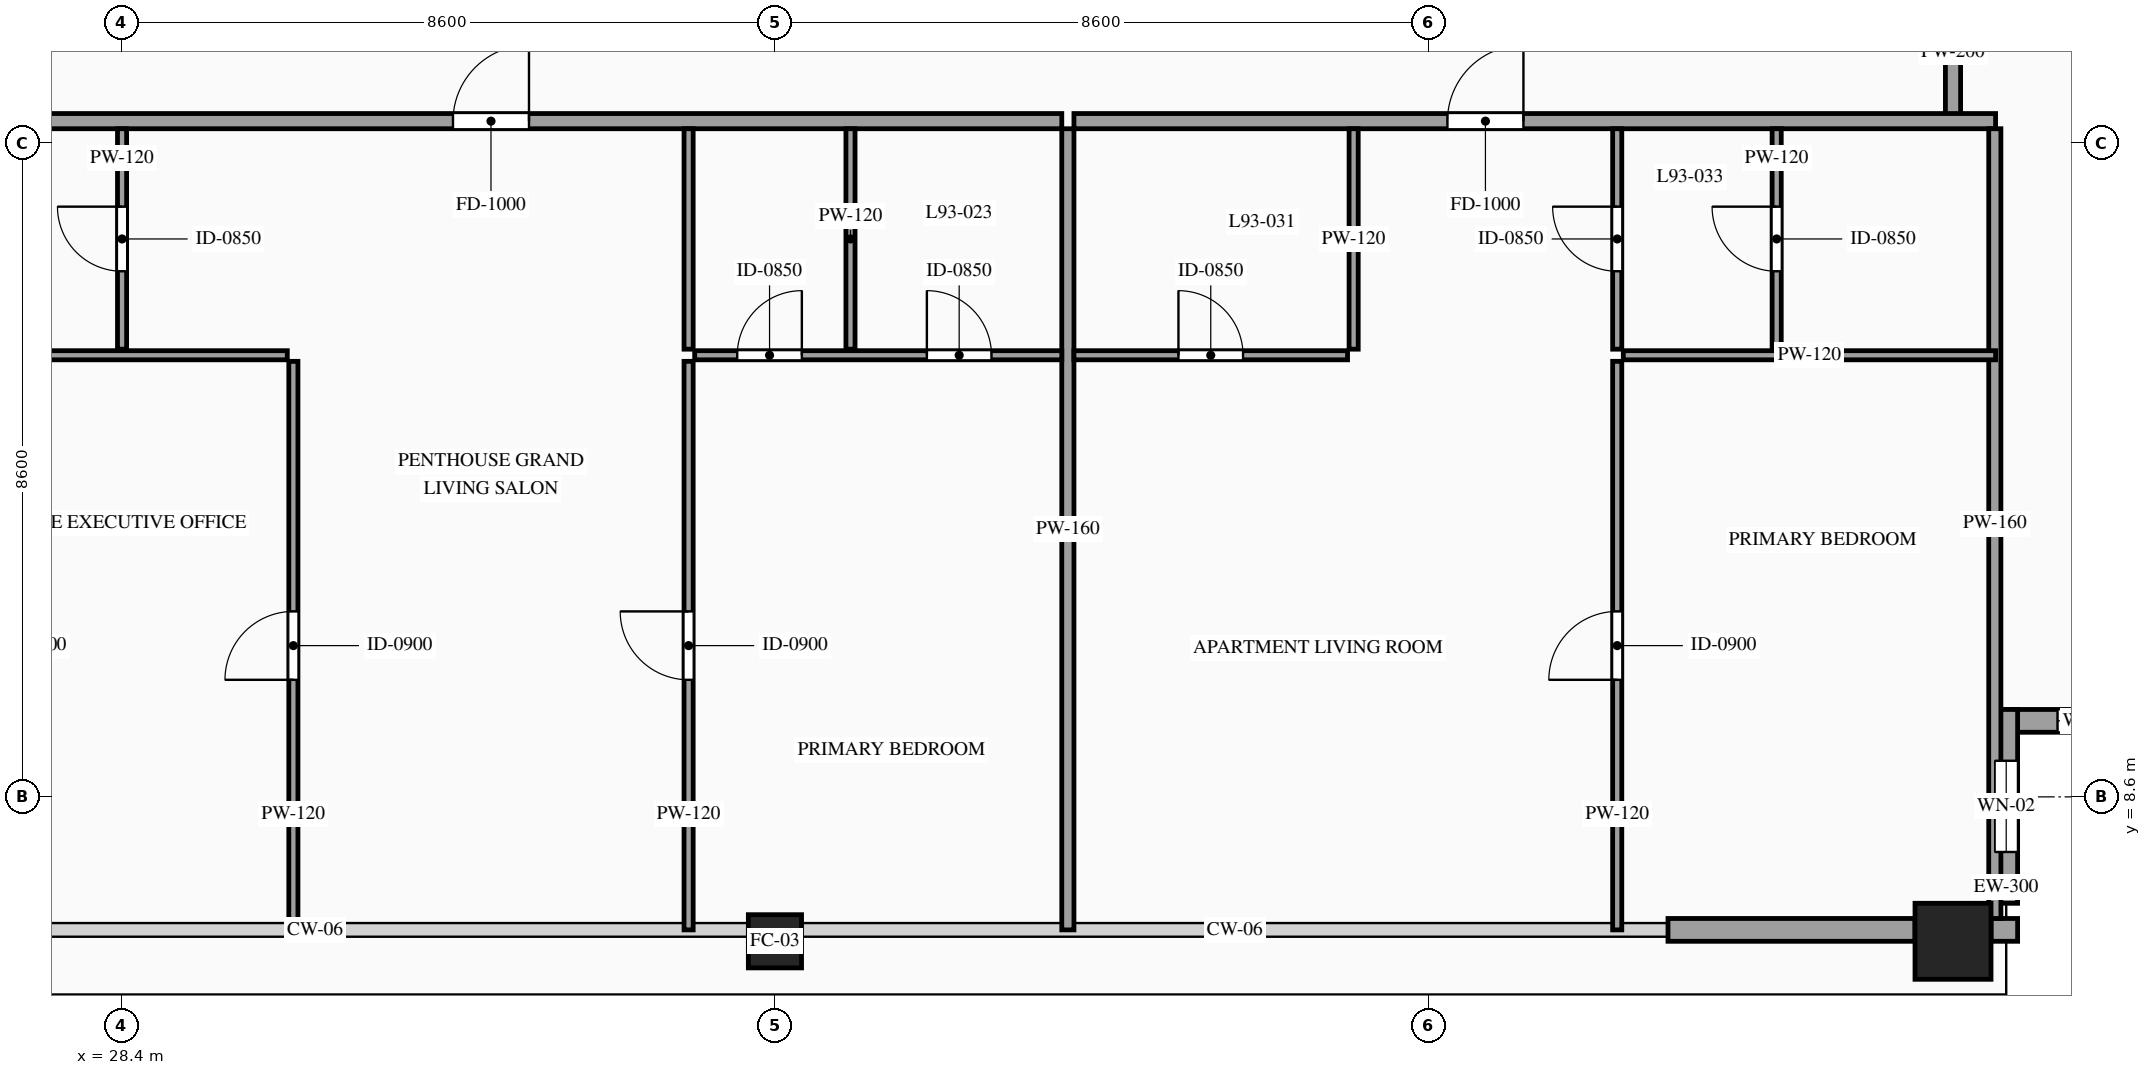
"""IFC4 building model, lengths in metres.
Left out: names, types, materials, properties, quantities, classifications, styles, units other than length and angle.
Written with IfcOpenShell. Run it as: python <this file> out.ifc"""

import sys

from ifc_helpers import new_model, si_unit, direction, frame, frame_2d, origin, origin_2d, place, context, subcontext, project, spatial, rectangle, hollow_rectangle, extrude, source, transform, mapped, element, fill, save


model = new_model("IFC4")
c1 = context("Model", 3, precision=1e-05, world=origin(), true_north=direction((0.0, 1.0)))
c2 = subcontext(c1, "Body", "Model", "MODEL_VIEW")
j1 = project(units=[si_unit("LENGTHUNIT", "METRE"), si_unit("PLANEANGLEUNIT", "RADIAN")], contexts=[c1])
p1 = place(None, origin())
s1 = spatial("IfcSite", under=j1, at=p1, CompositionType="ELEMENT")
p2 = place(p1, origin())
s2 = spatial("IfcBuilding", under=s1, at=p2, CompositionType="ELEMENT")
p3 = place(p2, frame((0.0, 0.0, 347.2)))
s3 = spatial("IfcBuildingStorey", under=s2, at=p3, CompositionType="ELEMENT", Elevation=347.2)
m1 = source(origin(), c2, "Body", "SweptSolid", [
    extrude(hollow_rectangle(XDim=0.7, YDim=0.7, WallThickness=0.032, at=origin_2d()), origin(), (0.0, 0.0, 1.0), 4.0),
])
p4 = place(p3, frame((37.0, 6.7, 0.0), z_axis=(0.0, 0.0, 1.0), x_axis=(1.0, 0.0, 0.0)))
e1 = element("IfcColumn", 1, at=p4, inside=s3, PredefinedType="COLUMN", context=c2, shape_type="MappedRepresentation", body=[
    mapped(m1, transform((0.0, 0.0, 0.0), scale=1.0)),
])
m2 = source(origin(), c2, "Body", "SweptSolid", [
    extrude(hollow_rectangle(XDim=1.0, YDim=1.0, WallThickness=0.048, at=origin_2d()), origin(), (0.0, 0.0, 1.0), 4.0),
])
p5 = place(p3, frame((52.5, 6.7, 0.0), z_axis=(0.0, 0.0, 1.0), x_axis=(1.0, 0.0, 0.0)))
e2 = element("IfcColumn", 2, at=p5, inside=s3, PredefinedType="COLUMN", context=c2, shape_type="MappedRepresentation", body=[
    mapped(m2, transform((0.0, 0.0, 0.0), scale=1.0)),
])
p6 = place(p3, frame((53.05, 9.6, 0.0), z_axis=(0.0, 0.0, 1.0), x_axis=(1.0, 0.0, 0.0)))
e3 = element("IfcWall", 3, at=p6, inside=s3, PredefinedType="SOLIDWALL", context=c2, shape_type="SweptSolid", body=[
    extrude(rectangle(XDim=2.55, YDim=0.3, at=frame_2d((1.275, 0.0))), origin(), (0.0, 0.0, 1.0), 3.7),
])
p7 = place(p6, frame((0.825, 0.0, 0.85)))
e4 = element("IfcOpeningElement", 4, at=p7, cuts=e3, PredefinedType="OPENING", context=c2, shape_type="SweptSolid", body=[
    extrude(rectangle(XDim=0.9, YDim=1.5, at=frame_2d((0.45, 0.75))), frame((0.0, 0.165, 0.0), z_axis=(0.0, -1.0, 0.0), x_axis=(1.0, 0.0, 0.0)), (0.0, 0.0, 1.0), 0.33),
])
p8 = place(p3, frame((53.2, 7.2, 0.0), z_axis=(0.0, 0.0, 1.0), x_axis=(0.0, 1.0, 0.0)))
e5 = element("IfcWall", 5, at=p8, inside=s3, PredefinedType="SOLIDWALL", context=c2, shape_type="SweptSolid", body=[
    extrude(rectangle(XDim=2.55, YDim=0.3, at=frame_2d((1.275, 0.0))), origin(), (0.0, 0.0, 1.0), 3.7),
])
p9 = place(p8, frame((0.675, 0.0, 0.85)))
e6 = element("IfcOpeningElement", 6, at=p9, cuts=e5, PredefinedType="OPENING", context=c2, shape_type="SweptSolid", body=[
    extrude(rectangle(XDim=1.2, YDim=2.1, at=frame_2d((0.6, 1.05))), frame((0.0, 0.165, 0.0), z_axis=(0.0, -1.0, 0.0), x_axis=(1.0, 0.0, 0.0)), (0.0, 0.0, 1.0), 0.33),
])
m3 = source(origin(), c2, "Body", "SweptSolid", [
    extrude(rectangle(XDim=0.35, YDim=0.3, at=frame_2d((0.175, 0.0))), origin(), (0.0, 0.0, 1.0), 3.7),
])
p10 = place(p3, frame((53.0, 6.85, 0.0), z_axis=(0.0, 0.0, 1.0), x_axis=(1.0, 0.0, 0.0)))
e7 = element("IfcWall", 7, at=p10, inside=s3, PredefinedType="SOLIDWALL", context=c2, shape_type="MappedRepresentation", body=[
    mapped(m3, transform((0.0, 0.0, 0.0), scale=1.0)),
])
m4 = source(origin(), c2, "Body", "SweptSolid", [
    extrude(rectangle(XDim=3.25, YDim=0.3, at=frame_2d((1.625, 0.0))), origin(), (0.0, 0.0, 1.0), 3.305),
])
p11 = place(p3, frame((48.75, 6.85, 0.0), z_axis=(0.0, 0.0, 1.0), x_axis=(1.0, 0.0, 0.0)))
e8 = element("IfcWall", 8, at=p11, inside=s3, PredefinedType="SOLIDWALL", context=c2, shape_type="MappedRepresentation", body=[
    mapped(m4, transform((0.0, 0.0, 0.0), scale=1.0)),
])
m5 = source(origin(), c2, "Body", "SweptSolid", [
    extrude(rectangle(XDim=1.7, YDim=0.2, at=frame_2d((0.85, 0.0))), origin(), (0.0, 0.0, 1.0), 3.7),
])
p12 = place(p3, frame((52.5, 17.55, 0.0), z_axis=(0.0, 0.0, 1.0), x_axis=(0.0, 1.0, 0.0)))
e9 = element("IfcWall", 9, at=p12, inside=s3, PredefinedType="PARTITIONING", context=c2, shape_type="MappedRepresentation", body=[
    mapped(m5, transform((0.0, 0.0, 0.0), scale=1.0)),
])
p13 = place(p3, frame((20.94, 17.49, 0.0), z_axis=(0.0, 0.0, 1.0), x_axis=(1.0, 0.0, 0.0)))
e10 = element("IfcWall", 10, at=p13, inside=s3, PredefinedType="PARTITIONING", context=c2, shape_type="SweptSolid", body=[
    extrude(rectangle(XDim=19.834, YDim=0.2, at=frame_2d((9.917, 0.0))), origin(), (0.0, 0.0, 1.0), 3.7),
])
p14 = place(p13, frame((11.824, 0.0, 0.0)))
e11 = element("IfcOpeningElement", 11, at=p14, cuts=e10, PredefinedType="OPENING", context=c2, shape_type="SweptSolid", body=[
    extrude(rectangle(XDim=1.0, YDim=2.2, at=frame_2d((0.5, 1.1))), frame((0.0, 0.115, 0.0), z_axis=(0.0, -1.0, 0.0), x_axis=(1.0, 0.0, 0.0)), (0.0, 0.0, 1.0), 0.23),
])
m6 = source(origin(), c2, "Body", "SweptSolid", [
    extrude(rectangle(XDim=10.54, YDim=0.16, at=frame_2d((5.27, 0.0))), origin(), (0.0, 0.0, 1.0), 3.7),
])
p15 = place(p3, frame((40.854, 6.85, 0.0), z_axis=(0.0, 0.0, 1.0), x_axis=(0.0, 1.0, 0.0)))
e12 = element("IfcWall", 12, at=p15, inside=s3, PredefinedType="PARTITIONING", context=c2, shape_type="MappedRepresentation", body=[
    mapped(m6, transform((0.0, 0.0, 0.0), scale=1.0)),
])
p16 = place(p3, frame((28.41, 14.49, 0.0), z_axis=(0.0, 0.0, 1.0), x_axis=(0.0, 1.0, 0.0)))
e13 = element("IfcWall", 13, at=p16, inside=s3, PredefinedType="PARTITIONING", context=c2, shape_type="SweptSolid", body=[
    extrude(rectangle(XDim=2.9, YDim=0.12, at=frame_2d((1.45, 0.0))), origin(), (0.0, 0.0, 1.0), 3.7),
])
p17 = place(p16, frame((1.025, 0.0, 0.0)))
e14 = element("IfcOpeningElement", 14, at=p17, cuts=e13, PredefinedType="OPENING", context=c2, shape_type="SweptSolid", body=[
    extrude(rectangle(XDim=0.85, YDim=2.1, at=frame_2d((0.425, 1.05))), frame((0.0, 0.075, 0.0), z_axis=(0.0, -1.0, 0.0), x_axis=(1.0, 0.0, 0.0)), (0.0, 0.0, 1.0), 0.15),
])
m7 = source(origin(), c2, "Body", "SweptSolid", [
    extrude(rectangle(XDim=2.9, YDim=0.12, at=frame_2d((1.45, 0.0))), origin(), (0.0, 0.0, 1.0), 3.7),
])
for number, where, z_axis, x_axis in (
    (15, (37.994, 14.49, 0.0), (0.0, 0.0, 1.0), (0.0, 1.0, 0.0)),
    (16, (35.864, 14.49, 0.0), (0.0, 0.0, 1.0), (0.0, 1.0, 0.0)),
):
    element("IfcWall", number, at=place(p3, frame(where, z_axis=z_axis, x_axis=x_axis)), inside=s3, PredefinedType="PARTITIONING", context=c2, shape_type="MappedRepresentation", body=[
        mapped(m7, transform((0.0, 0.0, 0.0), scale=1.0)),
    ])
p18 = place(p3, frame((35.944, 14.41, 0.0), z_axis=(0.0, 0.0, 1.0), x_axis=(1.0, 0.0, 0.0)))
e17 = element("IfcWall", 17, at=p18, inside=s3, PredefinedType="PARTITIONING", context=c2, shape_type="SweptSolid", body=[
    extrude(rectangle(XDim=4.83, YDim=0.12, at=frame_2d((2.415, 0.0))), origin(), (0.0, 0.0, 1.0), 3.7),
])
p19 = place(p18, frame((3.055, 0.0, 0.0)))
e18 = element("IfcOpeningElement", 18, at=p19, cuts=e17, PredefinedType="OPENING", context=c2, shape_type="SweptSolid", body=[
    extrude(rectangle(XDim=0.85, YDim=2.1, at=frame_2d((0.425, 1.05))), frame((0.0, 0.075, 0.0), z_axis=(0.0, -1.0, 0.0), x_axis=(1.0, 0.0, 0.0)), (0.0, 0.0, 1.0), 0.15),
])
p20 = place(p18, frame((0.56, 0.0, 0.0)))
e19 = element("IfcOpeningElement", 19, at=p20, cuts=e17, PredefinedType="OPENING", context=c2, shape_type="SweptSolid", body=[
    extrude(rectangle(XDim=0.85, YDim=2.1, at=frame_2d((0.425, 1.05))), frame((0.0, 0.075, 0.0), z_axis=(0.0, -1.0, 0.0), x_axis=(1.0, 0.0, 0.0)), (0.0, 0.0, 1.0), 0.15),
])
p21 = place(p3, frame((35.864, 6.85, 0.0), z_axis=(0.0, 0.0, 1.0), x_axis=(0.0, 1.0, 0.0)))
e20 = element("IfcWall", 20, at=p21, inside=s3, PredefinedType="PARTITIONING", context=c2, shape_type="SweptSolid", body=[
    extrude(rectangle(XDim=7.48, YDim=0.12, at=frame_2d((3.74, 0.0))), origin(), (0.0, 0.0, 1.0), 3.7),
])
p22 = place(p21, frame((3.29, 0.0, 0.0)))
e21 = element("IfcOpeningElement", 21, at=p22, cuts=e20, PredefinedType="OPENING", context=c2, shape_type="SweptSolid", body=[
    extrude(rectangle(XDim=0.9, YDim=2.15, at=frame_2d((0.45, 1.075))), frame((0.0, 0.075, 0.0), z_axis=(0.0, -1.0, 0.0), x_axis=(1.0, 0.0, 0.0)), (0.0, 0.0, 1.0), 0.15),
])
m8 = source(origin(), c2, "Body", "SweptSolid", [
    extrude(rectangle(XDim=4.654, YDim=0.12, at=frame_2d((2.327, 0.0))), origin(), (0.0, 0.0, 1.0), 3.7),
])
p23 = place(p3, frame((25.93, 14.41, 0.0), z_axis=(0.0, 0.0, 1.0), x_axis=(1.0, 0.0, 0.0)))
e22 = element("IfcWall", 22, at=p23, inside=s3, PredefinedType="PARTITIONING", context=c2, shape_type="MappedRepresentation", body=[
    mapped(m8, transform((0.0, 0.0, 0.0), scale=1.0)),
])
p24 = place(p3, frame((30.664, 6.85, 0.0), z_axis=(0.0, 0.0, 1.0), x_axis=(0.0, 1.0, 0.0)))
e23 = element("IfcWall", 23, at=p24, inside=s3, PredefinedType="PARTITIONING", context=c2, shape_type="SweptSolid", body=[
    extrude(rectangle(XDim=7.48, YDim=0.12, at=frame_2d((3.74, 0.0))), origin(), (0.0, 0.0, 1.0), 3.7),
])
p25 = place(p24, frame((3.29, 0.0, 0.0)))
e24 = element("IfcOpeningElement", 24, at=p25, cuts=e23, PredefinedType="OPENING", context=c2, shape_type="SweptSolid", body=[
    extrude(rectangle(XDim=0.9, YDim=2.15, at=frame_2d((0.45, 1.075))), frame((0.0, 0.075, 0.0), z_axis=(0.0, -1.0, 0.0), x_axis=(1.0, 0.0, 0.0)), (0.0, 0.0, 1.0), 0.15),
])
p26 = place(p3, frame((40.934, 17.49, 0.0), z_axis=(0.0, 0.0, 1.0), x_axis=(1.0, 0.0, 0.0)))
e25 = element("IfcWall", 25, at=p26, inside=s3, PredefinedType="PARTITIONING", context=c2, shape_type="SweptSolid", body=[
    extrude(rectangle(XDim=12.126, YDim=0.2, at=frame_2d((6.063, 0.0))), origin(), (0.0, 0.0, 1.0), 3.7),
])
p27 = place(p26, frame((4.914, 0.0, 0.0)))
e26 = element("IfcOpeningElement", 26, at=p27, cuts=e25, PredefinedType="OPENING", context=c2, shape_type="SweptSolid", body=[
    extrude(rectangle(XDim=1.0, YDim=2.2, at=frame_2d((0.5, 1.1))), frame((0.0, 0.115, 0.0), z_axis=(0.0, -1.0, 0.0), x_axis=(1.0, 0.0, 0.0)), (0.0, 0.0, 1.0), 0.23),
])
m9 = source(origin(), c2, "Body", "SweptSolid", [
    extrude(rectangle(XDim=10.39, YDim=0.16, at=frame_2d((5.195, 0.0))), origin(), (0.0, 0.0, 1.0), 3.7),
])
p28 = place(p3, frame((53.05, 7.0, 0.0), z_axis=(0.0, 0.0, 1.0), x_axis=(0.0, 1.0, 0.0)))
e27 = element("IfcWall", 27, at=p28, inside=s3, PredefinedType="PARTITIONING", context=c2, shape_type="MappedRepresentation", body=[
    mapped(m9, transform((0.0, 0.0, 0.0), scale=1.0)),
])
p29 = place(p3, frame((40.934, 14.41, 0.0), z_axis=(0.0, 0.0, 1.0), x_axis=(1.0, 0.0, 0.0)))
e28 = element("IfcWall", 28, at=p29, inside=s3, PredefinedType="PARTITIONING", context=c2, shape_type="SweptSolid", body=[
    extrude(rectangle(XDim=3.6, YDim=0.12, at=frame_2d((1.8, 0.0))), origin(), (0.0, 0.0, 1.0), 3.7),
])
p30 = place(p29, frame((1.375, 0.0, 0.0)))
e29 = element("IfcOpeningElement", 29, at=p30, cuts=e28, PredefinedType="OPENING", context=c2, shape_type="SweptSolid", body=[
    extrude(rectangle(XDim=0.85, YDim=2.1, at=frame_2d((0.425, 1.05))), frame((0.0, 0.075, 0.0), z_axis=(0.0, -1.0, 0.0), x_axis=(1.0, 0.0, 0.0)), (0.0, 0.0, 1.0), 0.15),
])
p31 = place(p3, frame((44.614, 14.49, 0.0), z_axis=(0.0, 0.0, 1.0), x_axis=(0.0, 1.0, 0.0)))
e30 = element("IfcWall", 30, at=p31, inside=s3, PredefinedType="PARTITIONING", context=c2, shape_type="MappedRepresentation", body=[
    mapped(m7, transform((0.0, 0.0, 0.0), scale=1.0)),
])
p32 = place(p3, frame((50.18, 14.49, 0.0), z_axis=(0.0, 0.0, 1.0), x_axis=(0.0, 1.0, 0.0)))
e31 = element("IfcWall", 31, at=p32, inside=s3, PredefinedType="PARTITIONING", context=c2, shape_type="SweptSolid", body=[
    extrude(rectangle(XDim=2.9, YDim=0.12, at=frame_2d((1.45, 0.0))), origin(), (0.0, 0.0, 1.0), 3.245),
])
p33 = place(p32, frame((1.025, 0.0, 0.0)))
e32 = element("IfcOpeningElement", 32, at=p33, cuts=e31, PredefinedType="OPENING", context=c2, shape_type="SweptSolid", body=[
    extrude(rectangle(XDim=0.85, YDim=2.1, at=frame_2d((0.425, 1.05))), frame((0.0, 0.075, 0.0), z_axis=(0.0, -1.0, 0.0), x_axis=(1.0, 0.0, 0.0)), (0.0, 0.0, 1.0), 0.15),
])
m10 = source(origin(), c2, "Body", "SweptSolid", [
    extrude(rectangle(XDim=4.898, YDim=0.12, at=frame_2d((2.449, 0.0))), origin(), (0.0, 0.0, 1.0), 3.7),
])
p34 = place(p3, frame((48.162, 14.41, 0.0), z_axis=(0.0, 0.0, 1.0), x_axis=(1.0, 0.0, 0.0)))
e33 = element("IfcWall", 33, at=p34, inside=s3, PredefinedType="PARTITIONING", context=c2, shape_type="MappedRepresentation", body=[
    mapped(m10, transform((0.0, 0.0, 0.0), scale=1.0)),
])
p35 = place(p3, frame((48.082, 6.85, 0.0), z_axis=(0.0, 0.0, 1.0), x_axis=(0.0, 1.0, 0.0)))
e34 = element("IfcWall", 34, at=p35, inside=s3, PredefinedType="PARTITIONING", context=c2, shape_type="SweptSolid", body=[
    extrude(rectangle(XDim=7.48, YDim=0.12, at=frame_2d((3.74, 0.0))), origin(), (0.0, 0.0, 1.0), 3.7),
])
p36 = place(p35, frame((3.29, 0.0, 0.0)))
e35 = element("IfcOpeningElement", 35, at=p36, cuts=e34, PredefinedType="OPENING", context=c2, shape_type="SweptSolid", body=[
    extrude(rectangle(XDim=0.9, YDim=2.15, at=frame_2d((0.45, 1.075))), frame((0.0, 0.075, 0.0), z_axis=(0.0, -1.0, 0.0), x_axis=(1.0, 0.0, 0.0)), (0.0, 0.0, 1.0), 0.15),
])
p37 = place(p3, frame((48.082, 14.49, 0.0), z_axis=(0.0, 0.0, 1.0), x_axis=(0.0, 1.0, 0.0)))
e36 = element("IfcWall", 36, at=p37, inside=s3, PredefinedType="PARTITIONING", context=c2, shape_type="SweptSolid", body=[
    extrude(rectangle(XDim=2.9, YDim=0.12, at=frame_2d((1.45, 0.0))), origin(), (0.0, 0.0, 1.0), 3.7),
])
p38 = place(p37, frame((1.025, 0.0, 0.0)))
e37 = element("IfcOpeningElement", 37, at=p38, cuts=e36, PredefinedType="OPENING", context=c2, shape_type="SweptSolid", body=[
    extrude(rectangle(XDim=0.85, YDim=2.1, at=frame_2d((0.425, 1.05))), frame((0.0, 0.075, 0.0), z_axis=(0.0, -1.0, 0.0), x_axis=(1.0, 0.0, 0.0)), (0.0, 0.0, 1.0), 0.15),
])
m11 = source(origin(), c2, "Body", "SweptSolid", [
    extrude(rectangle(XDim=0.9, YDim=1.5, at=frame_2d((0.45, 0.75))), frame((0.0, 0.03, 0.0), z_axis=(0.0, -1.0, 0.0), x_axis=(1.0, 0.0, 0.0)), (0.0, 0.0, 1.0), 0.06),
])
p39 = place(p7, origin())
e38 = element("IfcWindow", 38, at=p39, inside=s3, PartitioningType="SINGLE_PANEL", PredefinedType="WINDOW", context=c2, shape_type="MappedRepresentation", body=[
    mapped(m11, transform((0.0, 0.0, 0.0), scale=1.0)),
])
fill(e4, e38)
m12 = source(origin(), c2, "Body", "SweptSolid", [
    extrude(rectangle(XDim=1.2, YDim=2.1, at=frame_2d((0.6, 1.05))), frame((0.0, 0.03, 0.0), z_axis=(0.0, -1.0, 0.0), x_axis=(1.0, 0.0, 0.0)), (0.0, 0.0, 1.0), 0.06),
])
p40 = place(p9, origin())
e39 = element("IfcWindow", 39, at=p40, inside=s3, PartitioningType="SINGLE_PANEL", PredefinedType="WINDOW", context=c2, shape_type="MappedRepresentation", body=[
    mapped(m12, transform((0.0, 0.0, 0.0), scale=1.0)),
])
fill(e6, e39)
m13 = source(origin(), c2, "Body", "SweptSolid", [
    extrude(rectangle(XDim=1.0, YDim=2.2, at=frame_2d((0.5, 1.1))), frame((0.0, 0.025, 0.0), z_axis=(0.0, -1.0, 0.0), x_axis=(1.0, 0.0, 0.0)), (0.0, 0.0, 1.0), 0.05),
])
p41 = place(p14, origin())
e40 = element("IfcDoor", 40, at=p41, inside=s3, OperationType="SINGLE_SWING_RIGHT", PredefinedType="DOOR", context=c2, shape_type="MappedRepresentation", body=[
    mapped(m13, transform((0.0, 0.0, 0.0), scale=1.0)),
])
fill(e11, e40)
m14 = source(origin(), c2, "Body", "SweptSolid", [
    extrude(rectangle(XDim=0.85, YDim=2.1, at=frame_2d((0.425, 1.05))), frame((0.0, 0.025, 0.0), z_axis=(0.0, -1.0, 0.0), x_axis=(1.0, 0.0, 0.0)), (0.0, 0.0, 1.0), 0.05),
])
p42 = place(p17, origin())
e41 = element("IfcDoor", 41, at=p42, inside=s3, OperationType="SINGLE_SWING_RIGHT", PredefinedType="DOOR", context=c2, shape_type="MappedRepresentation", body=[
    mapped(m14, transform((0.0, 0.0, 0.0), scale=1.0)),
])
fill(e14, e41)
p43 = place(p19, origin())
e42 = element("IfcDoor", 42, at=p43, inside=s3, OperationType="SINGLE_SWING_LEFT", PredefinedType="DOOR", context=c2, shape_type="MappedRepresentation", body=[
    mapped(m14, transform((0.0, 0.0, 0.0), scale=1.0)),
])
fill(e18, e42)
p44 = place(p20, origin())
e43 = element("IfcDoor", 43, at=p44, inside=s3, OperationType="SINGLE_SWING_RIGHT", PredefinedType="DOOR", context=c2, shape_type="MappedRepresentation", body=[
    mapped(m14, transform((0.0, 0.0, 0.0), scale=1.0)),
])
fill(e19, e43)
m15 = source(origin(), c2, "Body", "SweptSolid", [
    extrude(rectangle(XDim=0.9, YDim=2.15, at=frame_2d((0.45, 1.075))), frame((0.0, 0.025, 0.0), z_axis=(0.0, -1.0, 0.0), x_axis=(1.0, 0.0, 0.0)), (0.0, 0.0, 1.0), 0.05),
])
p45 = place(p22, origin())
e44 = element("IfcDoor", 44, at=p45, inside=s3, OperationType="SINGLE_SWING_RIGHT", PredefinedType="DOOR", context=c2, shape_type="MappedRepresentation", body=[
    mapped(m15, transform((0.0, 0.0, 0.0), scale=1.0)),
])
fill(e21, e44)
p46 = place(p25, origin())
e45 = element("IfcDoor", 45, at=p46, inside=s3, OperationType="SINGLE_SWING_LEFT", PredefinedType="DOOR", context=c2, shape_type="MappedRepresentation", body=[
    mapped(m15, transform((0.0, 0.0, 0.0), scale=1.0)),
])
fill(e24, e45)
p47 = place(p27, origin())
e46 = element("IfcDoor", 46, at=p47, inside=s3, OperationType="SINGLE_SWING_RIGHT", PredefinedType="DOOR", context=c2, shape_type="MappedRepresentation", body=[
    mapped(m13, transform((0.0, 0.0, 0.0), scale=1.0)),
])
fill(e26, e46)
p48 = place(p30, origin())
e47 = element("IfcDoor", 47, at=p48, inside=s3, OperationType="SINGLE_SWING_LEFT", PredefinedType="DOOR", context=c2, shape_type="MappedRepresentation", body=[
    mapped(m14, transform((0.0, 0.0, 0.0), scale=1.0)),
])
fill(e29, e47)
p49 = place(p33, origin())
e48 = element("IfcDoor", 48, at=p49, inside=s3, OperationType="SINGLE_SWING_RIGHT", PredefinedType="DOOR", context=c2, shape_type="MappedRepresentation", body=[
    mapped(m14, transform((0.0, 0.0, 0.0), scale=1.0)),
])
fill(e32, e48)
p50 = place(p36, origin())
e49 = element("IfcDoor", 49, at=p50, inside=s3, OperationType="SINGLE_SWING_LEFT", PredefinedType="DOOR", context=c2, shape_type="MappedRepresentation", body=[
    mapped(m15, transform((0.0, 0.0, 0.0), scale=1.0)),
])
fill(e35, e49)
p51 = place(p38, origin())
e50 = element("IfcDoor", 50, at=p51, inside=s3, OperationType="SINGLE_SWING_RIGHT", PredefinedType="DOOR", context=c2, shape_type="MappedRepresentation", body=[
    mapped(m14, transform((0.0, 0.0, 0.0), scale=1.0)),
])
fill(e37, e50)
save(model, sys.argv[1])
